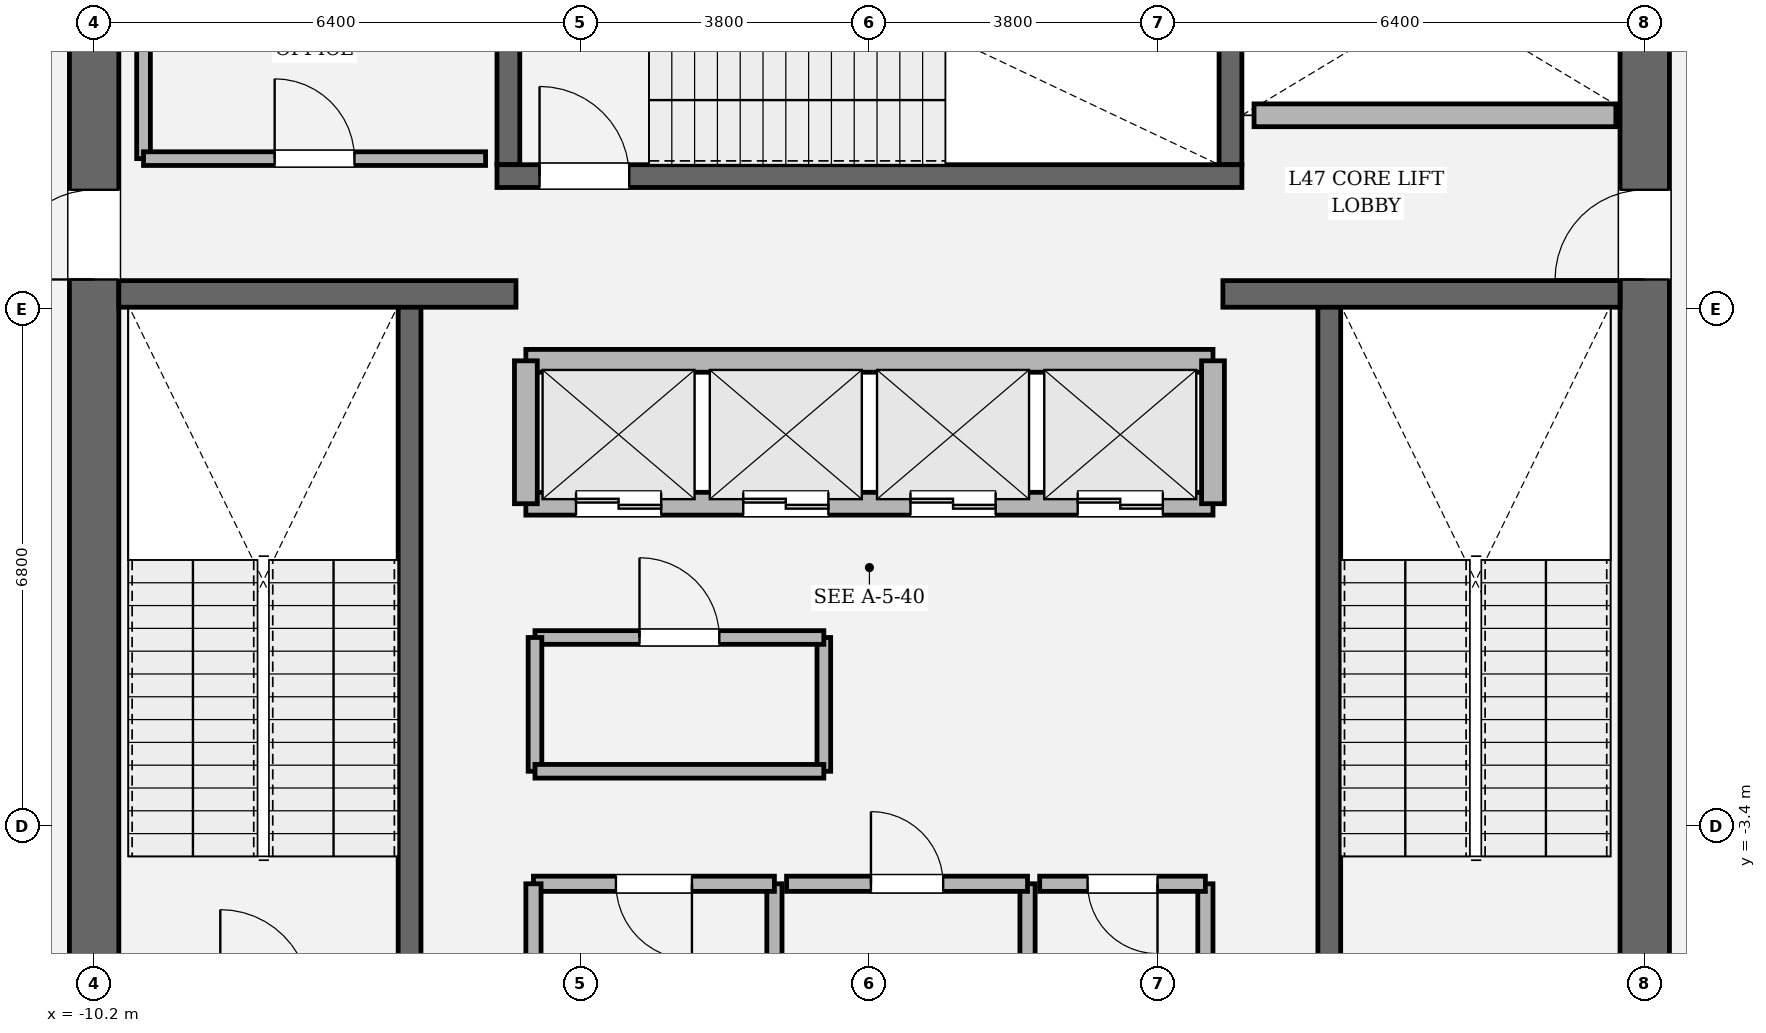
"""IFC4 building model, lengths in metres.
Left out: names, types, materials, properties, quantities, classifications, styles, units other than length and angle.
Written with IfcOpenShell. Run it as: python <this file> out.ifc"""

import sys

from ifc_helpers import new_model, si_unit, direction, frame, frame_2d, origin, place, context, subcontext, project, spatial, rectangle, extrude, element, fill, save


model = new_model("IFC4")
c1 = context("Model", 3, precision=1e-05, world=origin(), true_north=direction((0.0, 1.0)))
c2 = subcontext(c1, "Body", "Model", "MODEL_VIEW")
j1 = project(units=[si_unit("LENGTHUNIT", "METRE"), si_unit("PLANEANGLEUNIT", "RADIAN")], contexts=[c1])
p1 = place(None, origin())
s1 = spatial("IfcSite", under=j1, at=p1, CompositionType="ELEMENT")
p2 = place(p1, origin())
s2 = spatial("IfcBuilding", under=s1, at=p2, CompositionType="ELEMENT")
p3 = place(p2, frame((0.0, 0.0, 200.55)))
s3 = spatial("IfcBuildingStorey", under=s2, at=p3, CompositionType="ELEMENT", Elevation=200.55)
p4 = place(p3, frame((-10.2, -8.875, 0.0), z_axis=(0.0, 0.0, 1.0), x_axis=(0.0, 1.0, 0.0)))
e1 = element("IfcWall", 1, at=p4, inside=s3, PredefinedType="SHEAR", context=c2, shape_type="SweptSolid", body=[
    extrude(rectangle(XDim=17.75, YDim=0.65, at=frame_2d((8.875, 0.0))), origin(), (0.0, 0.0, 1.0), 4.05),
])
p5 = place(p4, frame((12.665, 0.0, 0.0)))
e2 = element("IfcOpeningElement", 2, at=p5, cuts=e1, PredefinedType="OPENING", context=c2, shape_type="SweptSolid", body=[
    extrude(rectangle(XDim=1.18, YDim=2.2, at=frame_2d((0.59, 1.1))), frame((0.0, 0.335, 0.0), z_axis=(0.0, -1.0, 0.0), x_axis=(1.0, 0.0, 0.0)), (0.0, 0.0, 1.0), 0.67),
])
p6 = place(p3, frame((10.2, 8.875, 0.0), z_axis=(0.0, 0.0, 1.0), x_axis=(0.0, -1.0, 0.0)))
e3 = element("IfcWall", 3, at=p6, inside=s3, PredefinedType="SHEAR", context=c2, shape_type="SweptSolid", body=[
    extrude(rectangle(XDim=17.75, YDim=0.65, at=frame_2d((8.875, 0.0))), origin(), (0.0, 0.0, 1.0), 4.05),
])
p7 = place(p6, frame((3.905, 0.0, 0.0)))
e4 = element("IfcOpeningElement", 4, at=p7, cuts=e3, PredefinedType="OPENING", context=c2, shape_type="SweptSolid", body=[
    extrude(rectangle(XDim=1.18, YDim=2.2, at=frame_2d((0.59, 1.1))), frame((0.0, 0.335, 0.0), z_axis=(0.0, -1.0, 0.0), x_axis=(1.0, 0.0, 0.0)), (0.0, 0.0, 1.0), 0.67),
])
for number, where, z_axis, x_axis in (
    (5, (-6.05, -5.5, 0.0), (0.0, 0.0, 1.0), (0.0, 1.0, 0.0)),
    (6, (6.05, 3.45, 0.0), (0.0, 0.0, 1.0), (0.0, -1.0, 0.0)),
):
    element("IfcWall", number, at=place(p3, frame(where, z_axis=z_axis, x_axis=x_axis)), inside=s3, PredefinedType="SOLIDWALL", context=c2, shape_type="SweptSolid", body=[
        extrude(rectangle(XDim=8.95, YDim=0.3, at=frame_2d((4.475, 0.0))), origin(), (0.0, 0.0, 1.0), 4.05),
    ])
for number, where, z_axis, x_axis in (
    (7, (-4.75, 5.3, 0.0), (0.0, 0.0, 1.0), (0.0, 1.0, 0.0)),
    (8, (4.75, 8.875, 0.0), (0.0, 0.0, 1.0), (0.0, -1.0, 0.0)),
):
    element("IfcWall", number, at=place(p3, frame(where, z_axis=z_axis, x_axis=x_axis)), inside=s3, PredefinedType="SOLIDWALL", context=c2, shape_type="SweptSolid", body=[
        extrude(rectangle(XDim=3.575, YDim=0.3, at=frame_2d((1.788, 0.0))), origin(), (0.0, 0.0, 1.0), 4.05),
    ])
p8 = place(p3, frame((-4.9, 5.15, 0.0), z_axis=(0.0, 0.0, 1.0), x_axis=(1.0, 0.0, 0.0)))
e9 = element("IfcWall", 9, at=p8, inside=s3, PredefinedType="SOLIDWALL", context=c2, shape_type="SweptSolid", body=[
    extrude(rectangle(XDim=9.8, YDim=0.3, at=frame_2d((4.9, 0.0))), origin(), (0.0, 0.0, 1.0), 4.05),
])
p9 = place(p8, frame((0.56, 0.0, 0.0)))
e10 = element("IfcOpeningElement", 10, at=p9, cuts=e9, PredefinedType="OPENING", context=c2, shape_type="SweptSolid", body=[
    extrude(rectangle(XDim=1.18, YDim=2.2, at=frame_2d((0.59, 1.1))), frame((0.0, 0.16, 0.0), z_axis=(0.0, -1.0, 0.0), x_axis=(1.0, 0.0, 0.0)), (0.0, 0.0, 1.0), 0.32),
])
for number, where, z_axis, x_axis in (
    (11, (-9.875, 3.6, 0.0), (0.0, 0.0, 1.0), (1.0, 0.0, 0.0)),
    (12, (4.65, 3.6, 0.0), (0.0, 0.0, 1.0), (1.0, 0.0, 0.0)),
):
    element("IfcWall", number, at=place(p3, frame(where, z_axis=z_axis, x_axis=x_axis)), inside=s3, PredefinedType="SOLIDWALL", context=c2, shape_type="SweptSolid", body=[
        extrude(rectangle(XDim=5.225, YDim=0.35, at=frame_2d((2.613, 0.0))), origin(), (0.0, 0.0, 1.0), 4.05),
    ])
p10 = place(p3, frame((-4.52, 0.84, 0.0), z_axis=(0.0, 0.0, 1.0), x_axis=(1.0, 0.0, 0.0)))
e13 = element("IfcWall", 13, at=p10, inside=s3, PredefinedType="SOLIDWALL", context=c2, shape_type="SweptSolid", body=[
    extrude(rectangle(XDim=9.04, YDim=0.3, at=frame_2d((4.52, 0.0))), origin(), (0.0, 0.0, 1.0), 3.77),
])
p11 = place(p10, frame((0.66, 0.0, 0.0)))
e14 = element("IfcOpeningElement", 14, at=p11, cuts=e13, PredefinedType="OPENING", context=c2, shape_type="SweptSolid", body=[
    extrude(rectangle(XDim=1.12, YDim=2.25, at=frame_2d((0.56, 1.125))), frame((0.0, 0.16, 0.0), z_axis=(0.0, -1.0, 0.0), x_axis=(1.0, 0.0, 0.0)), (0.0, 0.0, 1.0), 0.32),
])
p12 = place(p10, frame((2.86, 0.0, 0.0)))
e15 = element("IfcOpeningElement", 15, at=p12, cuts=e13, PredefinedType="OPENING", context=c2, shape_type="SweptSolid", body=[
    extrude(rectangle(XDim=1.12, YDim=2.25, at=frame_2d((0.56, 1.125))), frame((0.0, 0.16, 0.0), z_axis=(0.0, -1.0, 0.0), x_axis=(1.0, 0.0, 0.0)), (0.0, 0.0, 1.0), 0.32),
])
p13 = place(p10, frame((5.06, 0.0, 0.0)))
e16 = element("IfcOpeningElement", 16, at=p13, cuts=e13, PredefinedType="OPENING", context=c2, shape_type="SweptSolid", body=[
    extrude(rectangle(XDim=1.12, YDim=2.25, at=frame_2d((0.56, 1.125))), frame((0.0, 0.16, 0.0), z_axis=(0.0, -1.0, 0.0), x_axis=(1.0, 0.0, 0.0)), (0.0, 0.0, 1.0), 0.32),
])
p14 = place(p10, frame((7.26, 0.0, 0.0)))
e17 = element("IfcOpeningElement", 17, at=p14, cuts=e13, PredefinedType="OPENING", context=c2, shape_type="SweptSolid", body=[
    extrude(rectangle(XDim=1.12, YDim=2.25, at=frame_2d((0.56, 1.125))), frame((0.0, 0.16, 0.0), z_axis=(0.0, -1.0, 0.0), x_axis=(1.0, 0.0, 0.0)), (0.0, 0.0, 1.0), 0.32),
])
p15 = place(p3, frame((-4.52, 2.72, 0.0), z_axis=(0.0, 0.0, 1.0), x_axis=(1.0, 0.0, 0.0)))
e18 = element("IfcWall", 18, at=p15, inside=s3, PredefinedType="SOLIDWALL", context=c2, shape_type="SweptSolid", body=[
    extrude(rectangle(XDim=9.04, YDim=0.3, at=frame_2d((4.52, 0.0))), origin(), (0.0, 0.0, 1.0), 3.77),
])
for number, where, z_axis, x_axis in (
    (19, (-4.52, 0.84, 0.0), (0.0, 0.0, 1.0), (0.0, 1.0, 0.0)),
    (20, (4.52, 0.84, 0.0), (0.0, 0.0, 1.0), (0.0, 1.0, 0.0)),
):
    element("IfcWall", number, at=place(p3, frame(where, z_axis=z_axis, x_axis=x_axis)), inside=s3, PredefinedType="SOLIDWALL", context=c2, shape_type="SweptSolid", body=[
        extrude(rectangle(XDim=1.88, YDim=0.3, at=frame_2d((0.94, 0.0))), origin(), (0.0, 0.0, 1.0), 3.77),
    ])
p16 = place(p3, frame((5.06, 5.95, 0.0), z_axis=(0.0, 0.0, 1.0), x_axis=(1.0, 0.0, 0.0)))
e21 = element("IfcWall", 21, at=p16, inside=s3, PredefinedType="SOLIDWALL", context=c2, shape_type="SweptSolid", body=[
    extrude(rectangle(XDim=4.76, YDim=0.3, at=frame_2d((2.38, 0.0))), origin(), (0.0, 0.0, 1.0), 3.77),
])
p17 = place(p3, frame((-1.25, -5.9, 0.0), z_axis=(0.0, 0.0, 1.0), x_axis=(0.0, 1.0, 0.0)))
e22 = element("IfcWall", 22, at=p17, inside=s3, PredefinedType="SOLIDWALL", context=c2, shape_type="SweptSolid", body=[
    extrude(rectangle(XDim=1.74, YDim=0.2, at=frame_2d((0.87, 0.0))), origin(), (0.0, 0.0, 1.0), 3.77),
])
p18 = place(p3, frame((-1.25, -4.16, 0.0), z_axis=(0.0, 0.0, 1.0), x_axis=(-1.0, 0.0, 0.0)))
e23 = element("IfcWall", 23, at=p18, inside=s3, PredefinedType="SOLIDWALL", context=c2, shape_type="SweptSolid", body=[
    extrude(rectangle(XDim=3.17, YDim=0.2, at=frame_2d((1.585, 0.0))), origin(), (0.0, 0.0, 1.0), 3.77),
])
p19 = place(p18, frame((1.085, 0.0, 0.0)))
e24 = element("IfcOpeningElement", 24, at=p19, cuts=e23, PredefinedType="OPENING", context=c2, shape_type="SweptSolid", body=[
    extrude(rectangle(XDim=1.0, YDim=2.15, at=frame_2d((0.5, 1.075))), frame((0.0, 0.11, 0.0), z_axis=(0.0, -1.0, 0.0), x_axis=(1.0, 0.0, 0.0)), (0.0, 0.0, 1.0), 0.22),
])
for number, where, z_axis, x_axis in (
    (25, (-4.42, -4.16, 0.0), (0.0, 0.0, 1.0), (0.0, -1.0, 0.0)),
    (26, (2.08, -5.9, 0.0), (0.0, 0.0, 1.0), (0.0, 1.0, 0.0)),
):
    element("IfcWall", number, at=place(p3, frame(where, z_axis=z_axis, x_axis=x_axis)), inside=s3, PredefinedType="SOLIDWALL", context=c2, shape_type="SweptSolid", body=[
        extrude(rectangle(XDim=1.74, YDim=0.2, at=frame_2d((0.87, 0.0))), origin(), (0.0, 0.0, 1.0), 3.77),
    ])
p20 = place(p3, frame((2.08, -4.16, 0.0), z_axis=(0.0, 0.0, 1.0), x_axis=(-1.0, 0.0, 0.0)))
e27 = element("IfcWall", 27, at=p20, inside=s3, PredefinedType="SOLIDWALL", context=c2, shape_type="SweptSolid", body=[
    extrude(rectangle(XDim=3.17, YDim=0.2, at=frame_2d((1.585, 0.0))), origin(), (0.0, 0.0, 1.0), 3.77),
])
p21 = place(p20, frame((1.11, 0.0, 0.0)))
e28 = element("IfcOpeningElement", 28, at=p21, cuts=e27, PredefinedType="OPENING", context=c2, shape_type="SweptSolid", body=[
    extrude(rectangle(XDim=0.95, YDim=2.15, at=frame_2d((0.475, 1.075))), frame((0.0, 0.11, 0.0), z_axis=(0.0, -1.0, 0.0), x_axis=(1.0, 0.0, 0.0)), (0.0, 0.0, 1.0), 0.22),
])
p22 = place(p3, frame((4.42, -5.9, 0.0), z_axis=(0.0, 0.0, 1.0), x_axis=(0.0, 1.0, 0.0)))
e29 = element("IfcWall", 29, at=p22, inside=s3, PredefinedType="SOLIDWALL", context=c2, shape_type="SweptSolid", body=[
    extrude(rectangle(XDim=1.74, YDim=0.2, at=frame_2d((0.87, 0.0))), origin(), (0.0, 0.0, 1.0), 3.77),
])
p23 = place(p3, frame((4.42, -4.16, 0.0), z_axis=(0.0, 0.0, 1.0), x_axis=(-1.0, 0.0, 0.0)))
e30 = element("IfcWall", 30, at=p23, inside=s3, PredefinedType="SOLIDWALL", context=c2, shape_type="SweptSolid", body=[
    extrude(rectangle(XDim=2.18, YDim=0.2, at=frame_2d((1.09, 0.0))), origin(), (0.0, 0.0, 1.0), 3.77),
])
p24 = place(p23, frame((0.63, 0.0, 0.0)))
e31 = element("IfcOpeningElement", 31, at=p24, cuts=e30, PredefinedType="OPENING", context=c2, shape_type="SweptSolid", body=[
    extrude(rectangle(XDim=0.92, YDim=2.1, at=frame_2d((0.46, 1.05))), frame((0.0, 0.11, 0.0), z_axis=(0.0, -1.0, 0.0), x_axis=(1.0, 0.0, 0.0)), (0.0, 0.0, 1.0), 0.22),
])
p25 = place(p3, frame((-0.6, -2.68, 0.0), z_axis=(0.0, 0.0, 1.0), x_axis=(0.0, 1.0, 0.0)))
e32 = element("IfcWall", 32, at=p25, inside=s3, PredefinedType="PARTITIONING", context=c2, shape_type="SweptSolid", body=[
    extrude(rectangle(XDim=1.76, YDim=0.18, at=frame_2d((0.88, 0.0))), origin(), (0.0, 0.0, 1.0), 3.77),
])
p26 = place(p3, frame((-0.6, -0.92, 0.0), z_axis=(0.0, 0.0, 1.0), x_axis=(-1.0, 0.0, 0.0)))
e33 = element("IfcWall", 33, at=p26, inside=s3, PredefinedType="PARTITIONING", context=c2, shape_type="SweptSolid", body=[
    extrude(rectangle(XDim=3.8, YDim=0.18, at=frame_2d((1.9, 0.0))), origin(), (0.0, 0.0, 1.0), 3.77),
])
p27 = place(p26, frame((1.375, 0.0, 0.0)))
e34 = element("IfcOpeningElement", 34, at=p27, cuts=e33, PredefinedType="OPENING", context=c2, shape_type="SweptSolid", body=[
    extrude(rectangle(XDim=1.05, YDim=2.2, at=frame_2d((0.525, 1.1))), frame((0.0, 0.1, 0.0), z_axis=(0.0, -1.0, 0.0), x_axis=(1.0, 0.0, 0.0)), (0.0, 0.0, 1.0), 0.2),
])
p28 = place(p3, frame((-4.4, -0.92, 0.0), z_axis=(0.0, 0.0, 1.0), x_axis=(0.0, -1.0, 0.0)))
e35 = element("IfcWall", 35, at=p28, inside=s3, PredefinedType="PARTITIONING", context=c2, shape_type="SweptSolid", body=[
    extrude(rectangle(XDim=1.76, YDim=0.18, at=frame_2d((0.88, 0.0))), origin(), (0.0, 0.0, 1.0), 3.77),
])
p29 = place(p3, frame((-4.4, -2.68, 0.0), z_axis=(0.0, 0.0, 1.0), x_axis=(1.0, 0.0, 0.0)))
e36 = element("IfcWall", 36, at=p29, inside=s3, PredefinedType="PARTITIONING", context=c2, shape_type="SweptSolid", body=[
    extrude(rectangle(XDim=3.8, YDim=0.18, at=frame_2d((1.9, 0.0))), origin(), (0.0, 0.0, 1.0), 3.77),
])
p30 = place(p3, frame((-9.55, 8.65, 0.0), z_axis=(0.0, 0.0, 1.0), x_axis=(0.0, -1.0, 0.0)))
e37 = element("IfcWall", 37, at=p30, inside=s3, PredefinedType="PARTITIONING", context=c2, shape_type="SweptSolid", body=[
    extrude(rectangle(XDim=3.27, YDim=0.18, at=frame_2d((1.635, 0.0))), origin(), (0.0, 0.0, 1.0), 3.77),
])
p31 = place(p3, frame((-9.55, 5.38, 0.0), z_axis=(0.0, 0.0, 1.0), x_axis=(1.0, 0.0, 0.0)))
e38 = element("IfcWall", 38, at=p31, inside=s3, PredefinedType="PARTITIONING", context=c2, shape_type="SweptSolid", body=[
    extrude(rectangle(XDim=4.5, YDim=0.18, at=frame_2d((2.25, 0.0))), origin(), (0.0, 0.0, 1.0), 3.77),
])
p32 = place(p31, frame((1.725, 0.0, 0.0)))
e39 = element("IfcOpeningElement", 39, at=p32, cuts=e38, PredefinedType="OPENING", context=c2, shape_type="SweptSolid", body=[
    extrude(rectangle(XDim=1.05, YDim=2.2, at=frame_2d((0.525, 1.1))), frame((0.0, 0.1, 0.0), z_axis=(0.0, -1.0, 0.0), x_axis=(1.0, 0.0, 0.0)), (0.0, 0.0, 1.0), 0.2),
])
p33 = place(p9, origin())
e40 = element("IfcDoor", 40, at=p33, inside=s3, OperationType="SINGLE_SWING_LEFT", PredefinedType="DOOR", context=c2, shape_type="SweptSolid", body=[
    extrude(rectangle(XDim=1.18, YDim=2.2, at=frame_2d((0.59, 1.1))), frame((0.0, 0.025, 0.0), z_axis=(0.0, -1.0, 0.0), x_axis=(1.0, 0.0, 0.0)), (0.0, 0.0, 1.0), 0.05),
])
fill(e10, e40)
p34 = place(p5, origin())
e41 = element("IfcDoor", 41, at=p34, inside=s3, OperationType="SINGLE_SWING_LEFT", PredefinedType="DOOR", context=c2, shape_type="SweptSolid", body=[
    extrude(rectangle(XDim=1.18, YDim=2.2, at=frame_2d((0.59, 1.1))), frame((0.0, 0.025, 0.0), z_axis=(0.0, -1.0, 0.0), x_axis=(1.0, 0.0, 0.0)), (0.0, 0.0, 1.0), 0.05),
])
fill(e2, e41)
p35 = place(p7, origin())
e42 = element("IfcDoor", 42, at=p35, inside=s3, OperationType="SINGLE_SWING_RIGHT", PredefinedType="DOOR", context=c2, shape_type="SweptSolid", body=[
    extrude(rectangle(XDim=1.18, YDim=2.2, at=frame_2d((0.59, 1.1))), frame((0.0, 0.025, 0.0), z_axis=(0.0, -1.0, 0.0), x_axis=(1.0, 0.0, 0.0)), (0.0, 0.0, 1.0), 0.05),
])
fill(e4, e42)
p36 = place(p11, origin())
e43 = element("IfcDoor", 43, at=p36, inside=s3, OperationType="DOUBLE_DOOR_SLIDING", PredefinedType="DOOR", context=c2, shape_type="SweptSolid", body=[
    extrude(rectangle(XDim=1.12, YDim=2.25, at=frame_2d((0.56, 1.125))), frame((0.0, 0.025, 0.0), z_axis=(0.0, -1.0, 0.0), x_axis=(1.0, 0.0, 0.0)), (0.0, 0.0, 1.0), 0.05),
])
fill(e14, e43)
p37 = place(p12, origin())
e44 = element("IfcDoor", 44, at=p37, inside=s3, OperationType="DOUBLE_DOOR_SLIDING", PredefinedType="DOOR", context=c2, shape_type="SweptSolid", body=[
    extrude(rectangle(XDim=1.12, YDim=2.25, at=frame_2d((0.56, 1.125))), frame((0.0, 0.025, 0.0), z_axis=(0.0, -1.0, 0.0), x_axis=(1.0, 0.0, 0.0)), (0.0, 0.0, 1.0), 0.05),
])
fill(e15, e44)
p38 = place(p13, origin())
e45 = element("IfcDoor", 45, at=p38, inside=s3, OperationType="DOUBLE_DOOR_SLIDING", PredefinedType="DOOR", context=c2, shape_type="SweptSolid", body=[
    extrude(rectangle(XDim=1.12, YDim=2.25, at=frame_2d((0.56, 1.125))), frame((0.0, 0.025, 0.0), z_axis=(0.0, -1.0, 0.0), x_axis=(1.0, 0.0, 0.0)), (0.0, 0.0, 1.0), 0.05),
])
fill(e16, e45)
p39 = place(p14, origin())
e46 = element("IfcDoor", 46, at=p39, inside=s3, OperationType="DOUBLE_DOOR_SLIDING", PredefinedType="DOOR", context=c2, shape_type="SweptSolid", body=[
    extrude(rectangle(XDim=1.12, YDim=2.25, at=frame_2d((0.56, 1.125))), frame((0.0, 0.025, 0.0), z_axis=(0.0, -1.0, 0.0), x_axis=(1.0, 0.0, 0.0)), (0.0, 0.0, 1.0), 0.05),
])
fill(e17, e46)
p40 = place(p19, origin())
e47 = element("IfcDoor", 47, at=p40, inside=s3, OperationType="SINGLE_SWING_LEFT", PredefinedType="DOOR", context=c2, shape_type="SweptSolid", body=[
    extrude(rectangle(XDim=1.0, YDim=2.15, at=frame_2d((0.5, 1.075))), frame((0.0, 0.025, 0.0), z_axis=(0.0, -1.0, 0.0), x_axis=(1.0, 0.0, 0.0)), (0.0, 0.0, 1.0), 0.05),
])
fill(e24, e47)
p41 = place(p21, origin())
e48 = element("IfcDoor", 48, at=p41, inside=s3, OperationType="SINGLE_SWING_RIGHT", PredefinedType="DOOR", context=c2, shape_type="SweptSolid", body=[
    extrude(rectangle(XDim=0.95, YDim=2.15, at=frame_2d((0.475, 1.075))), frame((0.0, 0.025, 0.0), z_axis=(0.0, -1.0, 0.0), x_axis=(1.0, 0.0, 0.0)), (0.0, 0.0, 1.0), 0.05),
])
fill(e28, e48)
p42 = place(p24, origin())
e49 = element("IfcDoor", 49, at=p42, inside=s3, OperationType="SINGLE_SWING_LEFT", PredefinedType="DOOR", context=c2, shape_type="SweptSolid", body=[
    extrude(rectangle(XDim=0.92, YDim=2.1, at=frame_2d((0.46, 1.05))), frame((0.0, 0.025, 0.0), z_axis=(0.0, -1.0, 0.0), x_axis=(1.0, 0.0, 0.0)), (0.0, 0.0, 1.0), 0.05),
])
fill(e31, e49)
p43 = place(p27, origin())
e50 = element("IfcDoor", 50, at=p43, inside=s3, OperationType="SINGLE_SWING_RIGHT", PredefinedType="DOOR", context=c2, shape_type="SweptSolid", body=[
    extrude(rectangle(XDim=1.05, YDim=2.2, at=frame_2d((0.525, 1.1))), frame((0.0, 0.025, 0.0), z_axis=(0.0, -1.0, 0.0), x_axis=(1.0, 0.0, 0.0)), (0.0, 0.0, 1.0), 0.05),
])
fill(e34, e50)
p44 = place(p32, origin())
e51 = element("IfcDoor", 51, at=p44, inside=s3, OperationType="SINGLE_SWING_LEFT", PredefinedType="DOOR", context=c2, shape_type="SweptSolid", body=[
    extrude(rectangle(XDim=1.05, YDim=2.2, at=frame_2d((0.525, 1.1))), frame((0.0, 0.025, 0.0), z_axis=(0.0, -1.0, 0.0), x_axis=(1.0, 0.0, 0.0)), (0.0, 0.0, 1.0), 0.05),
])
fill(e39, e51)
save(model, sys.argv[1])
